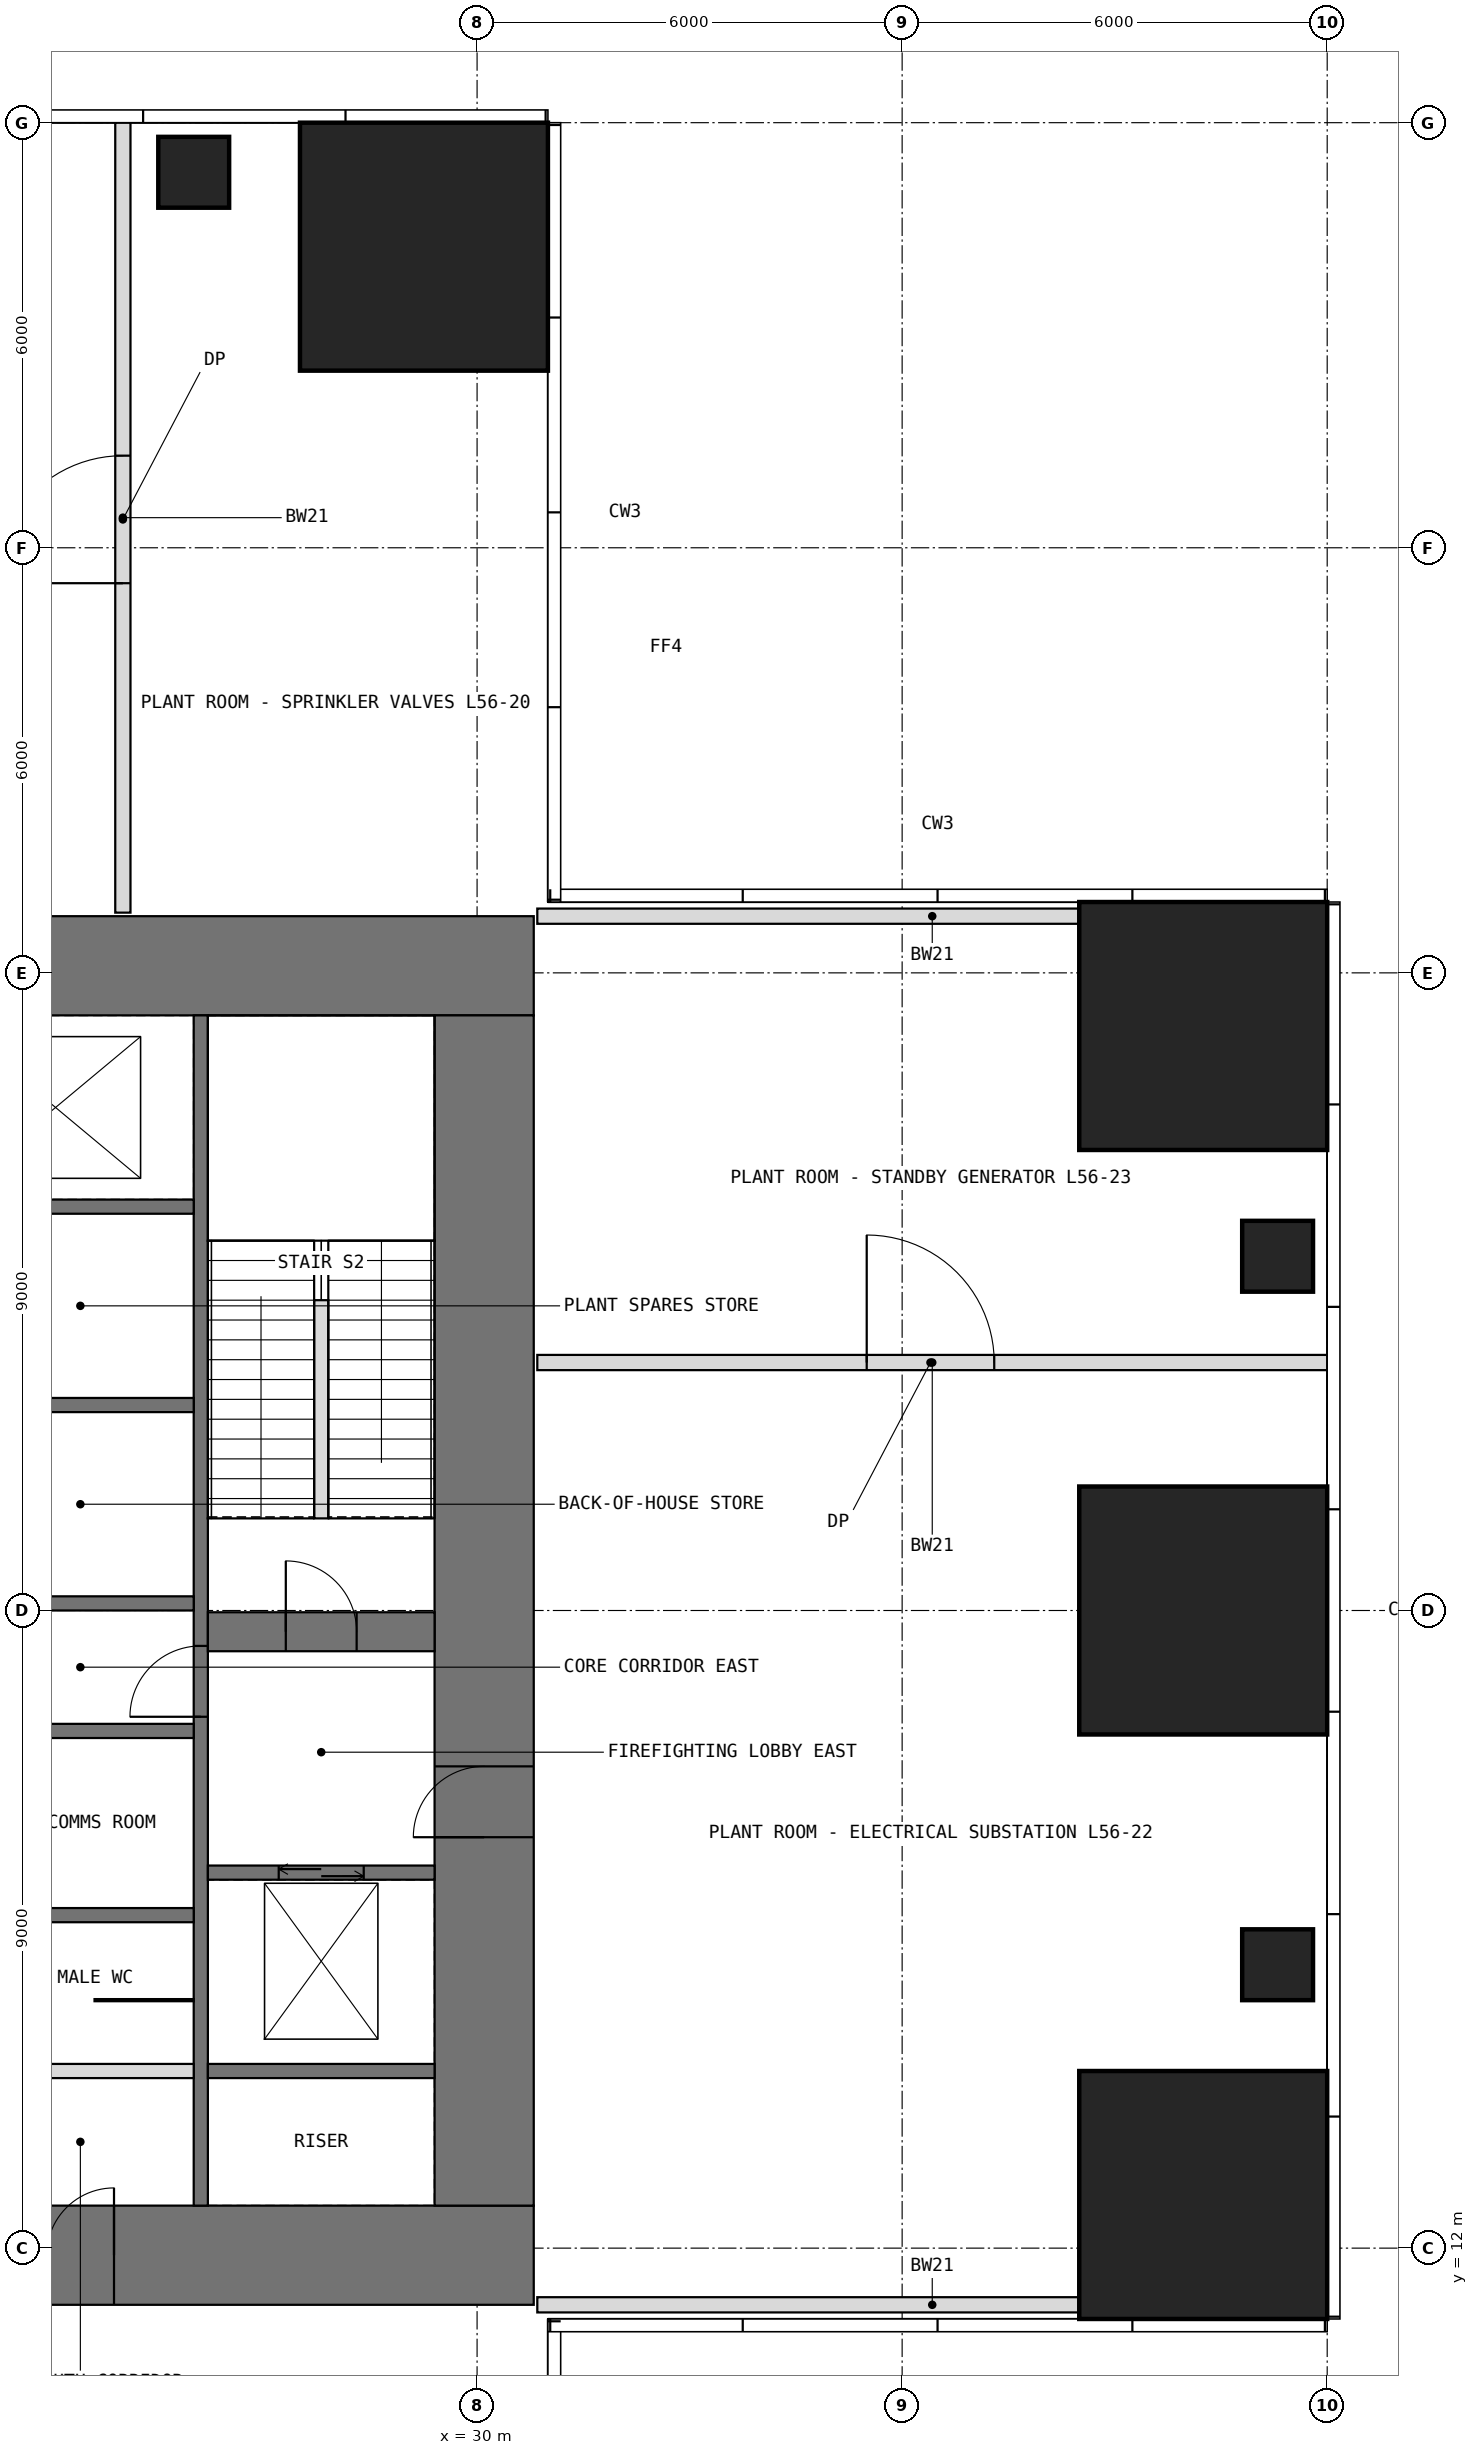
"""IFC4 building model, lengths in metres.
Left out: names, types, materials, properties, quantities, classifications, styles, units other than length and angle.
Written with IfcOpenShell. Run it as: python <this file> out.ifc"""

import sys

from ifc_helpers import new_model, si_unit, direction, frame, frame_2d, origin, origin_2d, place, context, subcontext, project, spatial, rectangle, extrude, element, fill, save


model = new_model("IFC4")
c1 = context("Model", 3, precision=1e-05, world=origin(), true_north=direction((0.0, 1.0)))
c2 = subcontext(c1, "Body", "Model", "MODEL_VIEW")
j1 = project(units=[si_unit("LENGTHUNIT", "METRE"), si_unit("PLANEANGLEUNIT", "RADIAN")], contexts=[c1])
p1 = place(None, origin())
s1 = spatial("IfcSite", under=j1, at=p1, CompositionType="ELEMENT")
p2 = place(p1, origin())
s2 = spatial("IfcBuilding", under=s1, at=p2, CompositionType="ELEMENT")
p3 = place(p2, frame((0.0, 0.0, 234.5)))
s3 = spatial("IfcBuildingStorey", under=s2, at=p3, CompositionType="ELEMENT", Elevation=234.5)
p4 = place(p3, frame((40.25, 12.75, 0.0), z_axis=(0.0, 0.0, 1.0), x_axis=(1.0, 0.0, 0.0)))
e1 = element("IfcColumn", 1, at=p4, inside=s3, PredefinedType="COLUMN", context=c2, shape_type="SweptSolid", body=[
    extrude(rectangle(XDim=3.5, YDim=3.5, at=origin_2d()), origin(), (0.0, 0.0, 1.0), 5.0),
])
p5 = place(p3, frame((41.3, 16.0, 0.0), z_axis=(0.0, 0.0, 1.0), x_axis=(1.0, 0.0, 0.0)))
e2 = element("IfcColumn", 2, at=p5, inside=s3, PredefinedType="COLUMN", context=c2, shape_type="SweptSolid", body=[
    extrude(rectangle(XDim=1.0, YDim=1.0, at=origin_2d()), origin(), (0.0, 0.0, 1.0), 5.0),
])
p6 = place(p3, frame((40.25, 21.0, 0.0), z_axis=(0.0, 0.0, 1.0), x_axis=(1.0, 0.0, 0.0)))
e3 = element("IfcColumn", 3, at=p6, inside=s3, PredefinedType="COLUMN", context=c2, shape_type="SweptSolid", body=[
    extrude(rectangle(XDim=3.5, YDim=3.5, at=origin_2d()), origin(), (0.0, 0.0, 1.0), 5.0),
])
p7 = place(p3, frame((41.3, 26.0, 0.0), z_axis=(0.0, 0.0, 1.0), x_axis=(1.0, 0.0, 0.0)))
e4 = element("IfcColumn", 4, at=p7, inside=s3, PredefinedType="COLUMN", context=c2, shape_type="SweptSolid", body=[
    extrude(rectangle(XDim=1.0, YDim=1.0, at=origin_2d()), origin(), (0.0, 0.0, 1.0), 5.0),
])
p8 = place(p3, frame((40.25, 29.25, 0.0), z_axis=(0.0, 0.0, 1.0), x_axis=(1.0, 0.0, 0.0)))
e5 = element("IfcColumn", 5, at=p8, inside=s3, PredefinedType="COLUMN", context=c2, shape_type="SweptSolid", body=[
    extrude(rectangle(XDim=3.5, YDim=3.5, at=origin_2d()), origin(), (0.0, 0.0, 1.0), 5.0),
])
p9 = place(p3, frame((26.0, 41.3, 0.0), z_axis=(0.0, 0.0, 1.0), x_axis=(1.0, 0.0, 0.0)))
e6 = element("IfcColumn", 6, at=p9, inside=s3, PredefinedType="COLUMN", context=c2, shape_type="SweptSolid", body=[
    extrude(rectangle(XDim=1.0, YDim=1.0, at=origin_2d()), origin(), (0.0, 0.0, 1.0), 5.0),
])
p10 = place(p3, frame((29.25, 40.25, 0.0), z_axis=(0.0, 0.0, 1.0), x_axis=(1.0, 0.0, 0.0)))
e7 = element("IfcColumn", 7, at=p10, inside=s3, PredefinedType="COLUMN", context=c2, shape_type="SweptSolid", body=[
    extrude(rectangle(XDim=3.5, YDim=3.5, at=origin_2d()), origin(), (0.0, 0.0, 1.0), 5.0),
])
p11 = place(p3, frame((11.2, 11.9, -0.25), z_axis=(0.0, 0.0, 1.0), x_axis=(1.0, 0.0, 0.0)))
e8 = element("IfcWall", 8, at=p11, inside=s3, PredefinedType="SHEAR", context=c2, shape_type="SweptSolid", body=[
    extrude(rectangle(XDim=19.6, YDim=1.4, at=frame_2d((9.8, 0.0))), origin(), (0.0, 0.0, 1.0), 5.2),
])
p12 = place(p11, frame((12.725, 0.0, 0.25)))
e9 = element("IfcOpeningElement", 9, at=p12, cuts=e8, PredefinedType="OPENING", context=c2, shape_type="SweptSolid", body=[
    extrude(rectangle(XDim=0.95, YDim=2.4, at=frame_2d((0.475, 1.2))), frame((0.0, 0.71, 0.0), z_axis=(0.0, -1.0, 0.0), x_axis=(1.0, 0.0, 0.0)), (0.0, 0.0, 1.0), 1.42),
])
p13 = place(p3, frame((11.2, 30.1, -0.25), z_axis=(0.0, 0.0, 1.0), x_axis=(1.0, 0.0, 0.0)))
e10 = element("IfcWall", 10, at=p13, inside=s3, PredefinedType="SHEAR", context=c2, shape_type="SweptSolid", body=[
    extrude(rectangle(XDim=19.6, YDim=1.4, at=frame_2d((9.8, 0.0))), origin(), (0.0, 0.0, 1.0), 5.2),
])
p14 = place(p13, frame((5.925, 0.0, 0.25)))
e11 = element("IfcOpeningElement", 11, at=p14, cuts=e10, PredefinedType="OPENING", context=c2, shape_type="SweptSolid", body=[
    extrude(rectangle(XDim=0.95, YDim=2.4, at=frame_2d((0.475, 1.2))), frame((0.0, 0.71, 0.0), z_axis=(0.0, -1.0, 0.0), x_axis=(1.0, 0.0, 0.0)), (0.0, 0.0, 1.0), 1.42),
])
p15 = place(p3, frame((30.1, 12.6, -0.25), z_axis=(0.0, 0.0, 1.0), x_axis=(0.0, 1.0, 0.0)))
e12 = element("IfcWall", 12, at=p15, inside=s3, PredefinedType="SHEAR", context=c2, shape_type="SweptSolid", body=[
    extrude(rectangle(XDim=16.8, YDim=1.4, at=frame_2d((8.4, 0.0))), origin(), (0.0, 0.0, 1.0), 5.2),
])
p16 = place(p15, frame((5.2, 0.0, 0.25)))
e13 = element("IfcOpeningElement", 13, at=p16, cuts=e12, PredefinedType="OPENING", context=c2, shape_type="SweptSolid", body=[
    extrude(rectangle(XDim=1.0, YDim=2.2, at=frame_2d((0.5, 1.1))), frame((0.0, 0.71, 0.0), z_axis=(0.0, -1.0, 0.0), x_axis=(1.0, 0.0, 0.0)), (0.0, 0.0, 1.0), 1.42),
])
p17 = place(p3, frame((26.1, 12.6, -0.25), z_axis=(0.0, 0.0, 1.0), x_axis=(0.0, 1.0, 0.0)))
e14 = element("IfcWall", 14, at=p17, inside=s3, PredefinedType="SHEAR", context=c2, shape_type="SweptSolid", body=[
    extrude(rectangle(XDim=16.8, YDim=0.2, at=frame_2d((8.4, 0.0))), origin(), (0.0, 0.0, 1.0), 5.2),
])
p18 = place(p17, frame((6.9, 0.0, 0.25)))
e15 = element("IfcOpeningElement", 15, at=p18, cuts=e14, PredefinedType="OPENING", context=c2, shape_type="SweptSolid", body=[
    extrude(rectangle(XDim=1.0, YDim=2.2, at=frame_2d((0.5, 1.1))), frame((0.0, 0.11, 0.0), z_axis=(0.0, -1.0, 0.0), x_axis=(1.0, 0.0, 0.0)), (0.0, 0.0, 1.0), 0.22),
])
for number, where, z_axis, x_axis in (
    (16, (22.8, 16.7, -0.25), (0.0, 0.0, 1.0), (1.0, 0.0, 0.0)),
    (17, (22.8, 19.3, -0.25), (0.0, 0.0, 1.0), (1.0, 0.0, 0.0)),
    (18, (22.8, 21.1, -0.25), (0.0, 0.0, 1.0), (1.0, 0.0, 0.0)),
    (19, (22.8, 23.9, -0.25), (0.0, 0.0, 1.0), (1.0, 0.0, 0.0)),
    (20, (22.8, 26.7, -0.25), (0.0, 0.0, 1.0), (1.0, 0.0, 0.0)),
    (21, (26.2, 14.5, -0.25), (0.0, 0.0, 1.0), (1.0, 0.0, 0.0)),
):
    element("IfcWall", number, at=place(p3, frame(where, z_axis=z_axis, x_axis=x_axis)), inside=s3, PredefinedType="SHEAR", context=c2, shape_type="SweptSolid", body=[
        extrude(rectangle(XDim=3.2, YDim=0.2, at=frame_2d((1.6, 0.0))), origin(), (0.0, 0.0, 1.0), 5.2),
    ])
p19 = place(p3, frame((26.2, 17.3, -0.25), z_axis=(0.0, 0.0, 1.0), x_axis=(1.0, 0.0, 0.0)))
e22 = element("IfcWall", 22, at=p19, inside=s3, PredefinedType="SHEAR", context=c2, shape_type="SweptSolid", body=[
    extrude(rectangle(XDim=3.2, YDim=0.2, at=frame_2d((1.6, 0.0))), origin(), (0.0, 0.0, 1.0), 5.2),
])
p20 = place(p19, frame((1.0, 0.0, 0.25)))
e23 = element("IfcOpeningElement", 23, at=p20, cuts=e22, PredefinedType="OPENING", context=c2, shape_type="SweptSolid", body=[
    extrude(rectangle(XDim=1.2, YDim=2.2, at=frame_2d((0.6, 1.1))), frame((0.0, 0.11, 0.0), z_axis=(0.0, -1.0, 0.0), x_axis=(1.0, 0.0, 0.0)), (0.0, 0.0, 1.0), 0.22),
])
p21 = place(p3, frame((26.2, 20.7, -0.25), z_axis=(0.0, 0.0, 1.0), x_axis=(1.0, 0.0, 0.0)))
e24 = element("IfcWall", 24, at=p21, inside=s3, PredefinedType="SHEAR", context=c2, shape_type="SweptSolid", body=[
    extrude(rectangle(XDim=3.2, YDim=0.55, at=frame_2d((1.6, 0.0))), origin(), (0.0, 0.0, 1.0), 5.2),
])
p22 = place(p21, frame((1.1, 0.0, 0.25)))
e25 = element("IfcOpeningElement", 25, at=p22, cuts=e24, PredefinedType="OPENING", context=c2, shape_type="SweptSolid", body=[
    extrude(rectangle(XDim=1.0, YDim=2.2, at=frame_2d((0.5, 1.1))), frame((0.0, 0.285, 0.0), z_axis=(0.0, -1.0, 0.0), x_axis=(1.0, 0.0, 0.0)), (0.0, 0.0, 1.0), 0.57),
])
p23 = place(p3, frame((22.8, 14.5, 0.0), z_axis=(0.0, 0.0, 1.0), x_axis=(1.0, 0.0, 0.0)))
e26 = element("IfcWall", 26, at=p23, inside=s3, PredefinedType="PARTITIONING", context=c2, shape_type="SweptSolid", body=[
    extrude(rectangle(XDim=3.2, YDim=0.2, at=frame_2d((1.6, 0.0))), origin(), (0.0, 0.0, 1.0), 4.75),
])
p24 = place(p3, frame((24.6, 15.5, 0.0), z_axis=(0.0, 0.0, 1.0), x_axis=(1.0, 0.0, 0.0)))
e27 = element("IfcWall", 27, at=p24, inside=s3, PredefinedType="PARTITIONING", context=c2, shape_type="SweptSolid", body=[
    extrude(rectangle(XDim=1.4, YDim=0.03, at=frame_2d((0.7, 0.0))), origin(), (0.0, 0.0, 1.0), 4.75),
])
p25 = place(p3, frame((25.0, 30.85, 0.0), z_axis=(0.0, 0.0, 1.0), x_axis=(0.0, 1.0, 0.0)))
e28 = element("IfcWall", 28, at=p25, inside=s3, PredefinedType="PARTITIONING", context=c2, shape_type="SweptSolid", body=[
    extrude(rectangle(XDim=11.15, YDim=0.215, at=frame_2d((5.575, 0.0))), origin(), (0.0, 0.0, 1.0), 4.75),
])
p26 = place(p25, frame((4.65, 0.0, 0.0)))
e29 = element("IfcOpeningElement", 29, at=p26, cuts=e28, PredefinedType="OPENING", context=c2, shape_type="SweptSolid", body=[
    extrude(rectangle(XDim=1.8, YDim=2.4, at=frame_2d((0.9, 1.2))), frame((0.0, 0.118, 0.0), z_axis=(0.0, -1.0, 0.0), x_axis=(1.0, 0.0, 0.0)), (0.0, 0.0, 1.0), 0.235),
])
p27 = place(p3, frame((30.85, 11.2, 0.0), z_axis=(0.0, 0.0, 1.0), x_axis=(1.0, 0.0, 0.0)))
e30 = element("IfcWall", 30, at=p27, inside=s3, PredefinedType="PARTITIONING", context=c2, shape_type="SweptSolid", body=[
    extrude(rectangle(XDim=11.15, YDim=0.215, at=frame_2d((5.575, 0.0))), origin(), (0.0, 0.0, 1.0), 4.75),
])
p28 = place(p3, frame((30.85, 24.5, 0.0), z_axis=(0.0, 0.0, 1.0), x_axis=(1.0, 0.0, 0.0)))
e31 = element("IfcWall", 31, at=p28, inside=s3, PredefinedType="PARTITIONING", context=c2, shape_type="SweptSolid", body=[
    extrude(rectangle(XDim=11.15, YDim=0.215, at=frame_2d((5.575, 0.0))), origin(), (0.0, 0.0, 1.0), 4.75),
])
p29 = place(p28, frame((4.65, 0.0, 0.0)))
e32 = element("IfcOpeningElement", 32, at=p29, cuts=e31, PredefinedType="OPENING", context=c2, shape_type="SweptSolid", body=[
    extrude(rectangle(XDim=1.8, YDim=2.4, at=frame_2d((0.9, 1.2))), frame((0.0, 0.118, 0.0), z_axis=(0.0, -1.0, 0.0), x_axis=(1.0, 0.0, 0.0)), (0.0, 0.0, 1.0), 0.235),
])
p30 = place(p3, frame((30.85, 30.8, 0.0), z_axis=(0.0, 0.0, 1.0), x_axis=(1.0, 0.0, 0.0)))
e33 = element("IfcWall", 33, at=p30, inside=s3, PredefinedType="PARTITIONING", context=c2, shape_type="SweptSolid", body=[
    extrude(rectangle(XDim=11.15, YDim=0.215, at=frame_2d((5.575, 0.0))), origin(), (0.0, 0.0, 1.0), 4.75),
])
p31 = place(p3, frame((27.8, 22.3, 0.0), z_axis=(0.0, 0.0, 1.0), x_axis=(0.0, 1.0, 0.0)))
e34 = element("IfcWall", 34, at=p31, inside=s3, PredefinedType="PARTITIONING", context=c2, shape_type="SweptSolid", body=[
    extrude(rectangle(XDim=3.08, YDim=0.2, at=frame_2d((1.54, 0.0))), origin(), (0.0, 0.0, 1.0), 5.0),
])
p32 = place(p12, origin())
e35 = element("IfcDoor", 35, at=p32, inside=s3, OperationType="SINGLE_SWING_RIGHT", PredefinedType="DOOR", context=c2, shape_type="SweptSolid", body=[
    extrude(rectangle(XDim=0.95, YDim=2.4, at=frame_2d((0.475, 1.2))), frame((0.0, -0.175, 0.0), z_axis=(0.0, -1.0, 0.0), x_axis=(1.0, 0.0, 0.0)), (0.0, 0.0, 1.0), 0.05),
])
fill(e9, e35)
p33 = place(p16, origin())
e36 = element("IfcDoor", 36, at=p33, inside=s3, OperationType="SINGLE_SWING_LEFT", PredefinedType="DOOR", context=c2, shape_type="SweptSolid", body=[
    extrude(rectangle(XDim=1.0, YDim=2.2, at=frame_2d((0.5, 1.1))), frame((0.0, -0.175, 0.0), z_axis=(0.0, -1.0, 0.0), x_axis=(1.0, 0.0, 0.0)), (0.0, 0.0, 1.0), 0.05),
])
fill(e13, e36)
p34 = place(p22, origin())
e37 = element("IfcDoor", 37, at=p34, inside=s3, OperationType="SINGLE_SWING_LEFT", PredefinedType="DOOR", context=c2, shape_type="SweptSolid", body=[
    extrude(rectangle(XDim=1.0, YDim=2.2, at=frame_2d((0.5, 1.1))), frame((0.0, 0.025, 0.0), z_axis=(0.0, -1.0, 0.0), x_axis=(1.0, 0.0, 0.0)), (0.0, 0.0, 1.0), 0.05),
])
fill(e25, e37)
p35 = place(p18, origin())
e38 = element("IfcDoor", 38, at=p35, inside=s3, OperationType="SINGLE_SWING_LEFT", PredefinedType="DOOR", context=c2, shape_type="SweptSolid", body=[
    extrude(rectangle(XDim=1.0, YDim=2.2, at=frame_2d((0.5, 1.1))), frame((0.0, 0.025, 0.0), z_axis=(0.0, -1.0, 0.0), x_axis=(1.0, 0.0, 0.0)), (0.0, 0.0, 1.0), 0.05),
])
fill(e15, e38)
p36 = place(p26, origin())
e39 = element("IfcDoor", 39, at=p36, inside=s3, OperationType="DOUBLE_DOOR_SINGLE_SWING", PredefinedType="DOOR", context=c2, shape_type="SweptSolid", body=[
    extrude(rectangle(XDim=1.8, YDim=2.4, at=frame_2d((0.9, 1.2))), frame((0.0, 0.025, 0.0), z_axis=(0.0, -1.0, 0.0), x_axis=(1.0, 0.0, 0.0)), (0.0, 0.0, 1.0), 0.05),
])
fill(e29, e39)
p37 = place(p29, origin())
e40 = element("IfcDoor", 40, at=p37, inside=s3, OperationType="DOUBLE_DOOR_SINGLE_SWING", PredefinedType="DOOR", context=c2, shape_type="SweptSolid", body=[
    extrude(rectangle(XDim=1.8, YDim=2.4, at=frame_2d((0.9, 1.2))), frame((0.0, 0.025, 0.0), z_axis=(0.0, -1.0, 0.0), x_axis=(1.0, 0.0, 0.0)), (0.0, 0.0, 1.0), 0.05),
])
fill(e32, e40)
p38 = place(p20, origin())
e41 = element("IfcDoor", 41, at=p38, inside=s3, OperationType="DOUBLE_DOOR_SLIDING", PredefinedType="DOOR", context=c2, shape_type="SweptSolid", body=[
    extrude(rectangle(XDim=1.2, YDim=2.2, at=frame_2d((0.6, 1.1))), frame((0.0, 0.025, 0.0), z_axis=(0.0, -1.0, 0.0), x_axis=(1.0, 0.0, 0.0)), (0.0, 0.0, 1.0), 0.05),
])
fill(e23, e41)
save(model, sys.argv[1])
